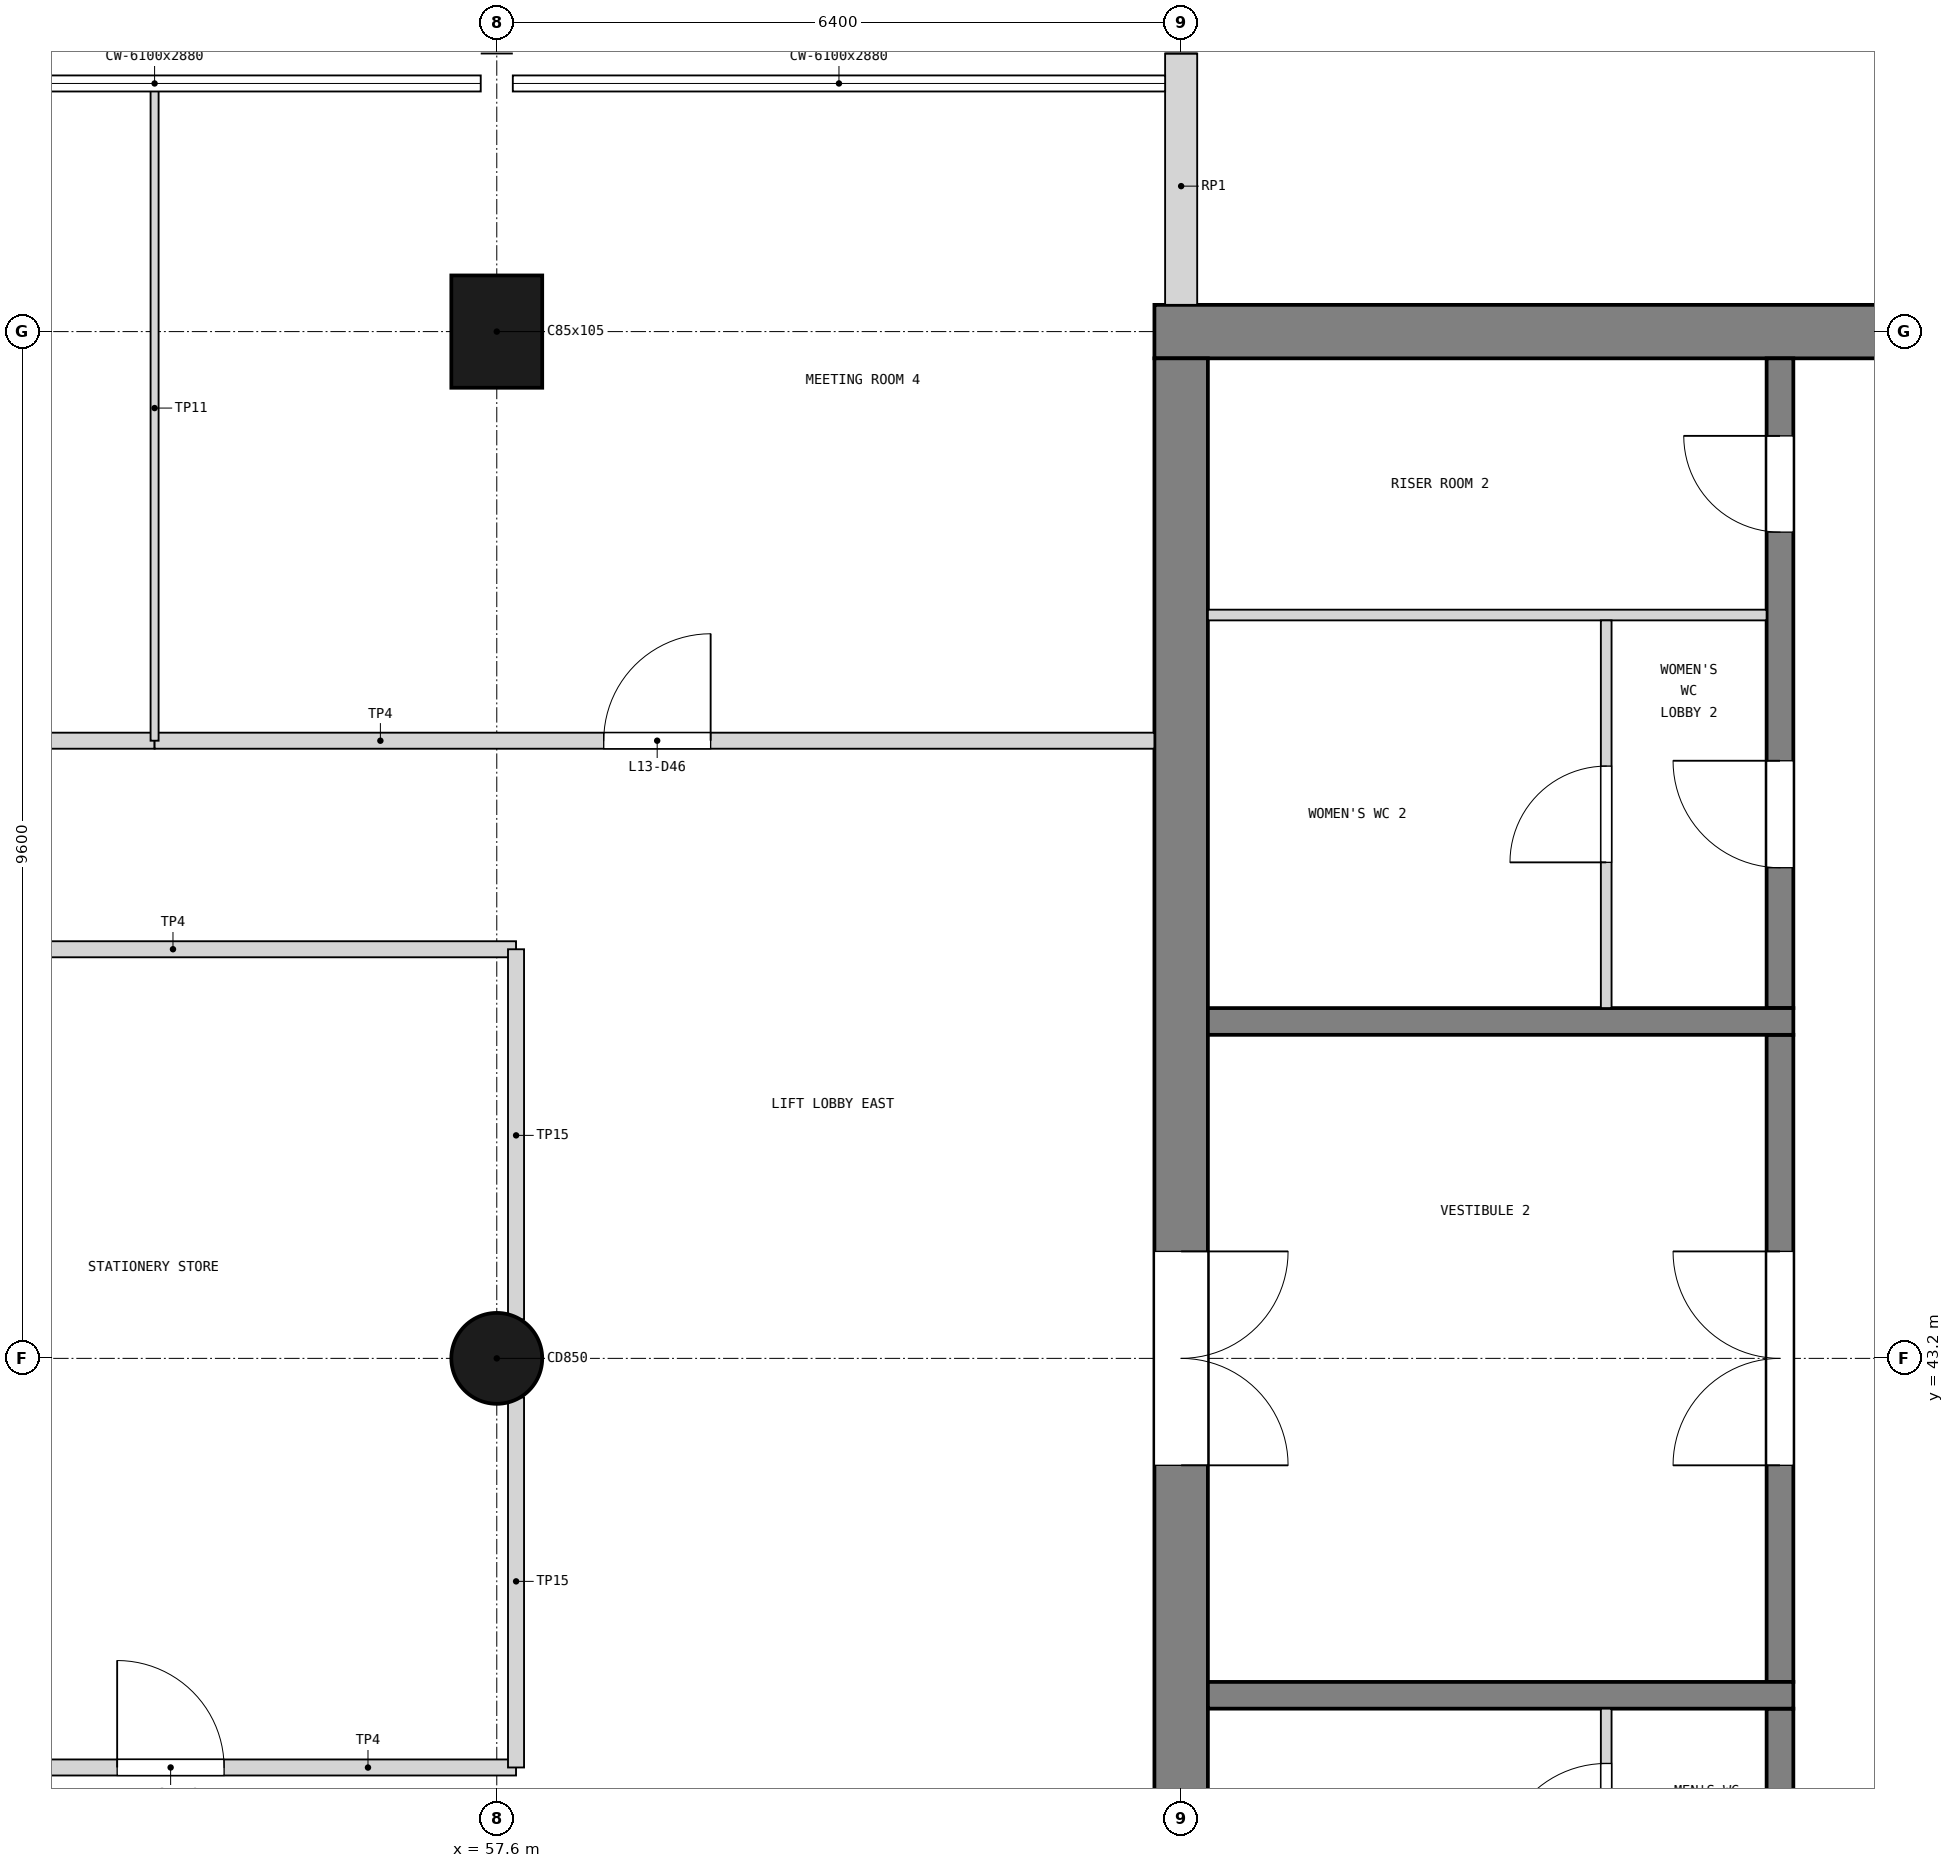
"""IFC4 building model, lengths in metres.
Left out: names, types, materials, properties, quantities, classifications, styles, units other than length and angle.
Written with IfcOpenShell. Run it as: python <this file> out.ifc"""

import sys

from ifc_helpers import new_model, si_unit, direction, frame, frame_2d, origin, origin_2d, place, context, subcontext, project, spatial, rectangle, circle, extrude, element, fill, save


model = new_model("IFC4")
c1 = context("Model", 3, precision=1e-05, world=origin(), true_north=direction((0.0, 1.0)))
c2 = subcontext(c1, "Body", "Model", "MODEL_VIEW")
j1 = project(units=[si_unit("LENGTHUNIT", "METRE"), si_unit("PLANEANGLEUNIT", "RADIAN")], contexts=[c1])
p1 = place(None, origin())
s1 = spatial("IfcSite", under=j1, at=p1, CompositionType="ELEMENT")
p2 = place(p1, origin())
s2 = spatial("IfcBuilding", under=s1, at=p2, CompositionType="ELEMENT")
p3 = place(p2, frame((0.0, 0.0, 52.2)))
s3 = spatial("IfcBuildingStorey", under=s2, at=p3, CompositionType="ELEMENT", Elevation=52.2)
p4 = place(p3, frame((63.75, 52.8, 0.0), z_axis=(0.0, 0.0, 1.0), x_axis=(1.0, 0.0, 0.0)))
e1 = element("IfcWall", 1, at=p4, inside=s3, PredefinedType="SHEAR", context=c2, shape_type="SweptSolid", body=[
    extrude(rectangle(XDim=13.3, YDim=0.5, at=frame_2d((6.65, 0.0))), origin(), (0.0, 0.0, 1.0), 3.9),
])
p5 = place(p4, frame((11.05, 0.0, 1.0)))
e2 = element("IfcOpeningElement", 2, at=p5, cuts=e1, PredefinedType="OPENING", context=c2, shape_type="SweptSolid", body=[
    extrude(rectangle(XDim=0.4, YDim=2.0, at=frame_2d((0.2, 1.0))), frame((0.0, 0.26, 0.0), z_axis=(0.0, -1.0, 0.0), x_axis=(1.0, 0.0, 0.0)), (0.0, 0.0, 1.0), 0.52),
])
p6 = place(p3, frame((64.0, 33.85, 0.0), z_axis=(0.0, 0.0, 1.0), x_axis=(0.0, 1.0, 0.0)))
e3 = element("IfcWall", 3, at=p6, inside=s3, PredefinedType="SHEAR", context=c2, shape_type="SweptSolid", body=[
    extrude(rectangle(XDim=18.7, YDim=0.5, at=frame_2d((9.35, 0.0))), origin(), (0.0, 0.0, 1.0), 3.9),
])
p7 = place(p6, frame((8.35, 0.0, 0.0)))
e4 = element("IfcOpeningElement", 4, at=p7, cuts=e3, PredefinedType="OPENING", context=c2, shape_type="SweptSolid", body=[
    extrude(rectangle(XDim=2.0, YDim=2.1, at=frame_2d((1.0, 1.05))), frame((0.0, 0.26, 0.0), z_axis=(0.0, -1.0, 0.0), x_axis=(1.0, 0.0, 0.0)), (0.0, 0.0, 1.0), 0.52),
])
p8 = place(p3, frame((57.6, 43.2, 0.0), z_axis=(0.0, 0.0, 1.0), x_axis=(1.0, 0.0, 0.0)))
e5 = element("IfcColumn", 5, at=p8, inside=s3, PredefinedType="COLUMN", context=c2, shape_type="SweptSolid", body=[
    extrude(circle(Radius=0.425, at=origin_2d()), origin(), (0.0, 0.0, 1.0), 3.9),
])
p9 = place(p3, frame((57.6, 52.8, 0.0), z_axis=(0.0, 0.0, 1.0), x_axis=(1.0, 0.0, 0.0)))
e6 = element("IfcColumn", 6, at=p9, inside=s3, PredefinedType="COLUMN", context=c2, shape_type="SweptSolid", body=[
    extrude(rectangle(XDim=0.85, YDim=1.05, at=origin_2d()), origin(), (0.0, 0.0, 1.0), 3.9),
])
p10 = place(p3, frame((64.0, 53.05, 0.0), z_axis=(0.0, 0.0, 1.0), x_axis=(0.0, 1.0, 0.0)))
e7 = element("IfcWall", 7, at=p10, inside=s3, PredefinedType="SOLIDWALL", context=c2, shape_type="SweptSolid", body=[
    extrude(rectangle(XDim=2.35, YDim=0.3, at=frame_2d((1.175, 0.0))), origin(), (0.0, 0.0, 1.0), 2.88),
])
p11 = place(p3, frame((69.6, 33.85, 0.0), z_axis=(0.0, 0.0, 1.0), x_axis=(0.0, 1.0, 0.0)))
e8 = element("IfcWall", 8, at=p11, inside=s3, PredefinedType="SOLIDWALL", context=c2, shape_type="SweptSolid", body=[
    extrude(rectangle(XDim=6.075, YDim=0.25, at=frame_2d((3.038, 0.0))), origin(), (0.0, 0.0, 1.0), 3.6),
])
p12 = place(p11, frame((0.425, 0.0, 0.0)))
e9 = element("IfcOpeningElement", 9, at=p12, cuts=e8, PredefinedType="OPENING", context=c2, shape_type="SweptSolid", body=[
    extrude(rectangle(XDim=0.8, YDim=2.1, at=frame_2d((0.4, 1.05))), frame((0.0, 0.135, 0.0), z_axis=(0.0, -1.0, 0.0), x_axis=(1.0, 0.0, 0.0)), (0.0, 0.0, 1.0), 0.27),
])
p13 = place(p11, frame((3.413, 0.0, 0.0)))
e10 = element("IfcOpeningElement", 10, at=p13, cuts=e8, PredefinedType="OPENING", context=c2, shape_type="SweptSolid", body=[
    extrude(rectangle(XDim=1.0, YDim=2.1, at=frame_2d((0.5, 1.05))), frame((0.0, 0.135, 0.0), z_axis=(0.0, -1.0, 0.0), x_axis=(1.0, 0.0, 0.0)), (0.0, 0.0, 1.0), 0.27),
])
p14 = place(p3, frame((69.6, 40.175, 0.0), z_axis=(0.0, 0.0, 1.0), x_axis=(0.0, 1.0, 0.0)))
e11 = element("IfcWall", 11, at=p14, inside=s3, PredefinedType="SOLIDWALL", context=c2, shape_type="SweptSolid", body=[
    extrude(rectangle(XDim=6.05, YDim=0.25, at=frame_2d((3.025, 0.0))), origin(), (0.0, 0.0, 1.0), 3.6),
])
p15 = place(p14, frame((2.025, 0.0, 0.0)))
e12 = element("IfcOpeningElement", 12, at=p15, cuts=e11, PredefinedType="OPENING", context=c2, shape_type="SweptSolid", body=[
    extrude(rectangle(XDim=2.0, YDim=2.1, at=frame_2d((1.0, 1.05))), frame((0.0, 0.135, 0.0), z_axis=(0.0, -1.0, 0.0), x_axis=(1.0, 0.0, 0.0)), (0.0, 0.0, 1.0), 0.27),
])
p16 = place(p3, frame((69.6, 46.475, 0.0), z_axis=(0.0, 0.0, 1.0), x_axis=(0.0, 1.0, 0.0)))
e13 = element("IfcWall", 13, at=p16, inside=s3, PredefinedType="SOLIDWALL", context=c2, shape_type="SweptSolid", body=[
    extrude(rectangle(XDim=6.075, YDim=0.25, at=frame_2d((3.038, 0.0))), origin(), (0.0, 0.0, 1.0), 3.6),
])
p17 = place(p16, frame((1.312, 0.0, 0.0)))
e14 = element("IfcOpeningElement", 14, at=p17, cuts=e13, PredefinedType="OPENING", context=c2, shape_type="SweptSolid", body=[
    extrude(rectangle(XDim=1.0, YDim=2.1, at=frame_2d((0.5, 1.05))), frame((0.0, 0.135, 0.0), z_axis=(0.0, -1.0, 0.0), x_axis=(1.0, 0.0, 0.0)), (0.0, 0.0, 1.0), 0.27),
])
p18 = place(p16, frame((4.45, 0.0, 0.0)))
e15 = element("IfcOpeningElement", 15, at=p18, cuts=e13, PredefinedType="OPENING", context=c2, shape_type="SweptSolid", body=[
    extrude(rectangle(XDim=0.9, YDim=2.1, at=frame_2d((0.45, 1.05))), frame((0.0, 0.135, 0.0), z_axis=(0.0, -1.0, 0.0), x_axis=(1.0, 0.0, 0.0)), (0.0, 0.0, 1.0), 0.27),
])
for number, where, z_axis, x_axis in (
    (16, (69.725, 40.05, 0.0), (0.0, 0.0, 1.0), (-1.0, 0.0, 0.0)),
    (17, (69.725, 46.35, 0.0), (0.0, 0.0, 1.0), (-1.0, 0.0, 0.0)),
):
    element("IfcWall", number, at=place(p3, frame(where, z_axis=z_axis, x_axis=x_axis)), inside=s3, PredefinedType="SOLIDWALL", context=c2, shape_type="SweptSolid", body=[
        extrude(rectangle(XDim=5.475, YDim=0.25, at=frame_2d((2.738, 0.0))), origin(), (0.0, 0.0, 1.0), 3.6),
    ])
p19 = place(p3, frame((67.975, 35.6, 0.0), z_axis=(0.0, 0.0, 1.0), x_axis=(0.0, 1.0, 0.0)))
e18 = element("IfcWall", 18, at=p19, inside=s3, PredefinedType="PARTITIONING", context=c2, shape_type="SweptSolid", body=[
    extrude(rectangle(XDim=4.325, YDim=0.1, at=frame_2d((2.163, 0.0))), origin(), (0.0, 0.0, 1.0), 3.6),
])
p20 = place(p19, frame((0.45, 0.0, 0.0)))
e19 = element("IfcOpeningElement", 19, at=p20, cuts=e18, PredefinedType="OPENING", context=c2, shape_type="SweptSolid", body=[
    extrude(rectangle(XDim=0.9, YDim=2.1, at=frame_2d((0.45, 1.05))), frame((0.0, 0.06, 0.0), z_axis=(0.0, -1.0, 0.0), x_axis=(1.0, 0.0, 0.0)), (0.0, 0.0, 1.0), 0.12),
])
p21 = place(p19, frame((2.812, 0.0, 0.0)))
e20 = element("IfcOpeningElement", 20, at=p21, cuts=e18, PredefinedType="OPENING", context=c2, shape_type="SweptSolid", body=[
    extrude(rectangle(XDim=1.0, YDim=2.1, at=frame_2d((0.5, 1.05))), frame((0.0, 0.06, 0.0), z_axis=(0.0, -1.0, 0.0), x_axis=(1.0, 0.0, 0.0)), (0.0, 0.0, 1.0), 0.12),
])
p22 = place(p3, frame((69.475, 50.15, 0.0), z_axis=(0.0, 0.0, 1.0), x_axis=(-1.0, 0.0, 0.0)))
e21 = element("IfcWall", 21, at=p22, inside=s3, PredefinedType="PARTITIONING", context=c2, shape_type="SweptSolid", body=[
    extrude(rectangle(XDim=5.225, YDim=0.1, at=frame_2d((2.613, 0.0))), origin(), (0.0, 0.0, 1.0), 3.6),
])
p23 = place(p3, frame((67.975, 46.475, 0.0), z_axis=(0.0, 0.0, 1.0), x_axis=(0.0, 1.0, 0.0)))
e22 = element("IfcWall", 22, at=p23, inside=s3, PredefinedType="PARTITIONING", context=c2, shape_type="SweptSolid", body=[
    extrude(rectangle(XDim=3.625, YDim=0.1, at=frame_2d((1.812, 0.0))), origin(), (0.0, 0.0, 1.0), 3.6),
])
p24 = place(p23, frame((1.363, 0.0, 0.0)))
e23 = element("IfcOpeningElement", 23, at=p24, cuts=e22, PredefinedType="OPENING", context=c2, shape_type="SweptSolid", body=[
    extrude(rectangle(XDim=0.9, YDim=2.1, at=frame_2d((0.45, 1.05))), frame((0.0, 0.06, 0.0), z_axis=(0.0, -1.0, 0.0), x_axis=(1.0, 0.0, 0.0)), (0.0, 0.0, 1.0), 0.12),
])
p25 = place(p3, frame((51.38, 39.375, 0.0), z_axis=(0.0, 0.0, 1.0), x_axis=(1.0, 0.0, 0.0)))
e24 = element("IfcWall", 24, at=p25, inside=s3, PredefinedType="PARTITIONING", context=c2, shape_type="SweptSolid", body=[
    extrude(rectangle(XDim=6.4, YDim=0.15, at=frame_2d((3.2, 0.0))), origin(), (0.0, 0.0, 1.0), 3.68),
])
p26 = place(p25, frame((2.67, 0.0, 0.0)))
e25 = element("IfcOpeningElement", 25, at=p26, cuts=e24, PredefinedType="OPENING", context=c2, shape_type="SweptSolid", body=[
    extrude(rectangle(XDim=1.0, YDim=2.1, at=frame_2d((0.5, 1.05))), frame((0.0, 0.085, 0.0), z_axis=(0.0, -1.0, 0.0), x_axis=(1.0, 0.0, 0.0)), (0.0, 0.0, 1.0), 0.17),
])
p27 = place(p3, frame((51.38, 47.025, 0.0), z_axis=(0.0, 0.0, 1.0), x_axis=(1.0, 0.0, 0.0)))
e26 = element("IfcWall", 26, at=p27, inside=s3, PredefinedType="PARTITIONING", context=c2, shape_type="SweptSolid", body=[
    extrude(rectangle(XDim=6.4, YDim=0.15, at=frame_2d((3.2, 0.0))), origin(), (0.0, 0.0, 1.0), 3.68),
])
p28 = place(p3, frame((44.62, 48.975, 0.0), z_axis=(0.0, 0.0, 1.0), x_axis=(1.0, 0.0, 0.0)))
e27 = element("IfcWall", 27, at=p28, inside=s3, PredefinedType="PARTITIONING", context=c2, shape_type="SweptSolid", body=[
    extrude(rectangle(XDim=9.78, YDim=0.15, at=frame_2d((4.89, 0.0))), origin(), (0.0, 0.0, 1.0), 3.68),
])
p29 = place(p28, frame((3.98, 0.0, 0.0)))
e28 = element("IfcOpeningElement", 28, at=p29, cuts=e27, PredefinedType="OPENING", context=c2, shape_type="SweptSolid", body=[
    extrude(rectangle(XDim=1.8, YDim=2.1, at=frame_2d((0.9, 1.05))), frame((0.0, 0.085, 0.0), z_axis=(0.0, -1.0, 0.0), x_axis=(1.0, 0.0, 0.0)), (0.0, 0.0, 1.0), 0.17),
])
p30 = place(p3, frame((54.4, 48.975, 0.0), z_axis=(0.0, 0.0, 1.0), x_axis=(1.0, 0.0, 0.0)))
e29 = element("IfcWall", 29, at=p30, inside=s3, PredefinedType="PARTITIONING", context=c2, shape_type="SweptSolid", body=[
    extrude(rectangle(XDim=9.35, YDim=0.15, at=frame_2d((4.675, 0.0))), origin(), (0.0, 0.0, 1.0), 3.68),
])
p31 = place(p30, frame((4.2, 0.0, 0.0)))
e30 = element("IfcOpeningElement", 30, at=p31, cuts=e29, PredefinedType="OPENING", context=c2, shape_type="SweptSolid", body=[
    extrude(rectangle(XDim=1.0, YDim=2.1, at=frame_2d((0.5, 1.05))), frame((0.0, 0.085, 0.0), z_axis=(0.0, -1.0, 0.0), x_axis=(1.0, 0.0, 0.0)), (0.0, 0.0, 1.0), 0.17),
])
p32 = place(p3, frame((54.4, 48.975, 0.0), z_axis=(0.0, 0.0, 1.0), x_axis=(0.0, 1.0, 0.0)))
e31 = element("IfcWall", 31, at=p32, inside=s3, PredefinedType="PARTITIONING", context=c2, shape_type="SweptSolid", body=[
    extrude(rectangle(XDim=6.125, YDim=0.075, at=frame_2d((3.062, 0.0))), origin(), (0.0, 0.0, 1.0), 3.08),
])
for number, where, z_axis, x_axis in (
    (32, (57.78, 39.375, 0.0), (0.0, 0.0, 1.0), (0.0, 1.0, 0.0)),
    (33, (57.78, 43.565, 0.0), (0.0, 0.0, 1.0), (0.0, 1.0, 0.0)),
):
    element("IfcWall", number, at=place(p3, frame(where, z_axis=z_axis, x_axis=x_axis)), inside=s3, PredefinedType="PARTITIONING", context=c2, shape_type="SweptSolid", body=[
        extrude(rectangle(XDim=3.46, YDim=0.15, at=frame_2d((1.73, 0.0))), origin(), (0.0, 0.0, 1.0), 2.78),
    ])
p33 = place(p15, origin())
e34 = element("IfcDoor", 34, at=p33, inside=s3, OperationType="DOUBLE_DOOR_SINGLE_SWING", PredefinedType="DOOR", context=c2, shape_type="SweptSolid", body=[
    extrude(rectangle(XDim=2.0, YDim=2.1, at=frame_2d((1.0, 1.05))), frame((0.0, 0.025, 0.0), z_axis=(0.0, -1.0, 0.0), x_axis=(1.0, 0.0, 0.0)), (0.0, 0.0, 1.0), 0.05),
])
fill(e12, e34)
p34 = place(p7, frame((2.0, 0.0, 0.0), z_axis=(0.0, 0.0, 1.0), x_axis=(-1.0, 0.0, 0.0)))
e35 = element("IfcDoor", 35, at=p34, inside=s3, OperationType="DOUBLE_DOOR_SINGLE_SWING", PredefinedType="DOOR", context=c2, shape_type="SweptSolid", body=[
    extrude(rectangle(XDim=2.0, YDim=2.1, at=frame_2d((1.0, 1.05))), frame((0.0, 0.025, 0.0), z_axis=(0.0, -1.0, 0.0), x_axis=(1.0, 0.0, 0.0)), (0.0, 0.0, 1.0), 0.05),
])
fill(e4, e35)
p35 = place(p21, origin())
e36 = element("IfcDoor", 36, at=p35, inside=s3, OperationType="SINGLE_SWING_LEFT", PredefinedType="DOOR", context=c2, shape_type="SweptSolid", body=[
    extrude(rectangle(XDim=1.0, YDim=2.1, at=frame_2d((0.5, 1.05))), frame((0.0, 0.025, 0.0), z_axis=(0.0, -1.0, 0.0), x_axis=(1.0, 0.0, 0.0)), (0.0, 0.0, 1.0), 0.05),
])
fill(e20, e36)
p36 = place(p17, origin())
e37 = element("IfcDoor", 37, at=p36, inside=s3, OperationType="SINGLE_SWING_RIGHT", PredefinedType="DOOR", context=c2, shape_type="SweptSolid", body=[
    extrude(rectangle(XDim=1.0, YDim=2.1, at=frame_2d((0.5, 1.05))), frame((0.0, 0.025, 0.0), z_axis=(0.0, -1.0, 0.0), x_axis=(1.0, 0.0, 0.0)), (0.0, 0.0, 1.0), 0.05),
])
fill(e14, e37)
p37 = place(p24, origin())
e38 = element("IfcDoor", 38, at=p37, inside=s3, OperationType="SINGLE_SWING_LEFT", PredefinedType="DOOR", context=c2, shape_type="SweptSolid", body=[
    extrude(rectangle(XDim=0.9, YDim=2.1, at=frame_2d((0.45, 1.05))), frame((0.0, 0.025, 0.0), z_axis=(0.0, -1.0, 0.0), x_axis=(1.0, 0.0, 0.0)), (0.0, 0.0, 1.0), 0.05),
])
fill(e23, e38)
p38 = place(p18, origin())
e39 = element("IfcDoor", 39, at=p38, inside=s3, OperationType="SINGLE_SWING_RIGHT", PredefinedType="DOOR", context=c2, shape_type="SweptSolid", body=[
    extrude(rectangle(XDim=0.9, YDim=2.1, at=frame_2d((0.45, 1.05))), frame((0.0, 0.025, 0.0), z_axis=(0.0, -1.0, 0.0), x_axis=(1.0, 0.0, 0.0)), (0.0, 0.0, 1.0), 0.05),
])
fill(e15, e39)
p39 = place(p26, origin())
e40 = element("IfcDoor", 40, at=p39, inside=s3, OperationType="SINGLE_SWING_LEFT", PredefinedType="DOOR", context=c2, shape_type="SweptSolid", body=[
    extrude(rectangle(XDim=1.0, YDim=2.1, at=frame_2d((0.5, 1.05))), frame((0.0, 0.025, 0.0), z_axis=(0.0, -1.0, 0.0), x_axis=(1.0, 0.0, 0.0)), (0.0, 0.0, 1.0), 0.05),
])
fill(e25, e40)
p40 = place(p31, origin())
e41 = element("IfcDoor", 41, at=p40, inside=s3, OperationType="SINGLE_SWING_RIGHT", PredefinedType="DOOR", context=c2, shape_type="SweptSolid", body=[
    extrude(rectangle(XDim=1.0, YDim=2.1, at=frame_2d((0.5, 1.05))), frame((0.0, 0.025, 0.0), z_axis=(0.0, -1.0, 0.0), x_axis=(1.0, 0.0, 0.0)), (0.0, 0.0, 1.0), 0.05),
])
fill(e30, e41)
save(model, sys.argv[1])
